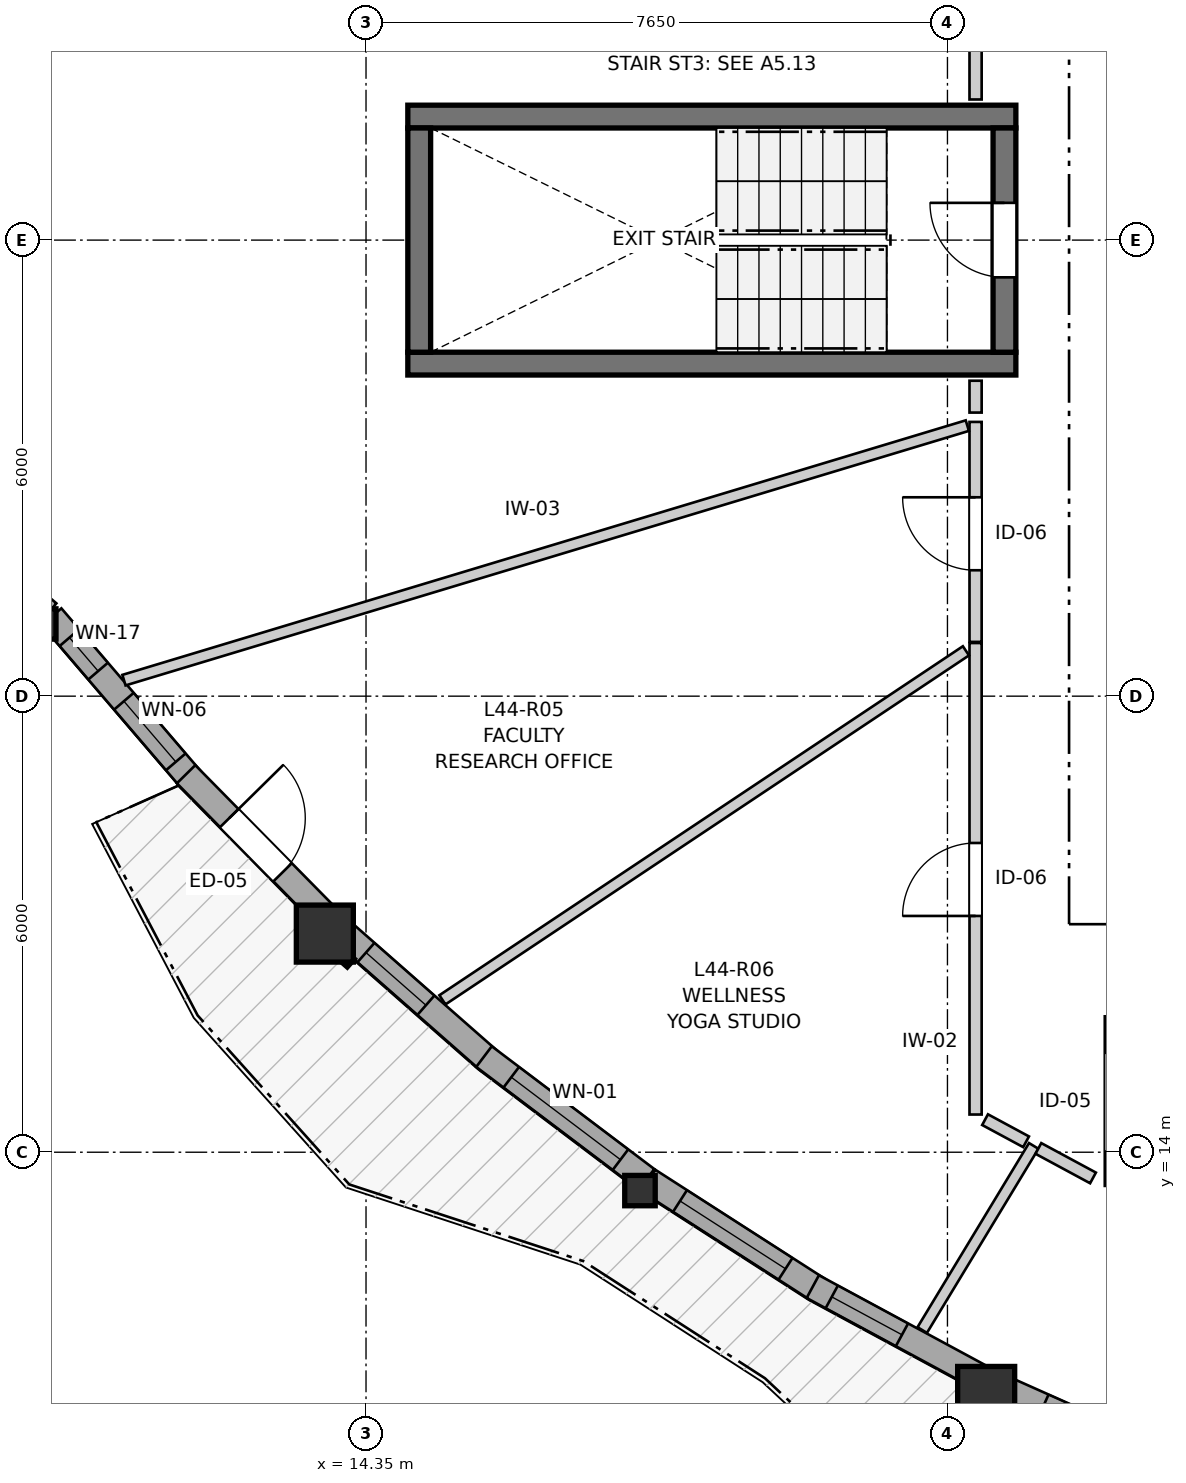
"""IFC4 building model, lengths in metres.
Left out: names, types, materials, properties, quantities, classifications, styles, units other than length and angle.
Written with IfcOpenShell. Run it as: python <this file> out.ifc"""

import sys

from ifc_helpers import new_model, si_unit, direction, frame, frame_2d, origin, origin_2d, place, context, subcontext, project, spatial, rectangle, i_section, extrude, source, transform, mapped, element, fill, save


model = new_model("IFC4")
c1 = context("Model", 3, precision=1e-05, world=origin(), true_north=direction((0.0, 1.0)))
c2 = subcontext(c1, "Body", "Model", "MODEL_VIEW")
j1 = project(units=[si_unit("LENGTHUNIT", "METRE"), si_unit("PLANEANGLEUNIT", "RADIAN")], contexts=[c1])
p1 = place(None, origin())
s1 = spatial("IfcSite", under=j1, at=p1, CompositionType="ELEMENT")
p2 = place(p1, origin())
s2 = spatial("IfcBuilding", under=s1, at=p2, CompositionType="ELEMENT")
p3 = place(p2, frame((0.0, 0.0, 149.0)))
s3 = spatial("IfcBuildingStorey", under=s2, at=p3, CompositionType="ELEMENT", Elevation=149.0)
for number, where, z_axis, x_axis in (
    (1, (14.9, 24.375, 0.0), (0.0, 0.0, 1.0), (1.0, 0.0, 0.0)),
    (2, (22.9, 27.625, 0.0), (0.0, 0.0, 1.0), (-1.0, 0.0, 0.0)),
):
    element("IfcWall", number, at=place(p3, frame(where, z_axis=z_axis, x_axis=x_axis)), inside=s3, PredefinedType="SHEAR", context=c2, shape_type="SweptSolid", body=[
        extrude(rectangle(XDim=8.0, YDim=0.3, at=frame_2d((4.0, 0.0))), origin(), (0.0, 0.0, 1.0), 2.935),
    ])
p4 = place(p3, frame((15.05, 27.475, 0.0), z_axis=(0.0, 0.0, 1.0), x_axis=(0.0, -1.0, 0.0)))
e3 = element("IfcWall", 3, at=p4, inside=s3, PredefinedType="SHEAR", context=c2, shape_type="SweptSolid", body=[
    extrude(rectangle(XDim=2.95, YDim=0.3, at=frame_2d((1.475, 0.0))), origin(), (0.0, 0.0, 1.0), 2.935),
])
p5 = place(p3, frame((22.75, 24.525, 0.0), z_axis=(0.0, 0.0, 1.0), x_axis=(0.0, 1.0, 0.0)))
e4 = element("IfcWall", 4, at=p5, inside=s3, PredefinedType="SHEAR", context=c2, shape_type="SweptSolid", body=[
    extrude(rectangle(XDim=2.95, YDim=0.3, at=frame_2d((1.475, 0.0))), origin(), (0.0, 0.0, 1.0), 2.935),
])
p6 = place(p5, frame((0.985, 0.0, 0.0)))
e5 = element("IfcOpeningElement", 5, at=p6, cuts=e4, PredefinedType="OPENING", context=c2, shape_type="SweptSolid", body=[
    extrude(rectangle(XDim=0.98, YDim=2.15, at=frame_2d((0.49, 1.075))), frame((0.0, 0.16, 0.0), z_axis=(0.0, -1.0, 0.0), x_axis=(1.0, 0.0, 0.0)), (0.0, 0.0, 1.0), 0.32),
])
m1 = source(origin(), c2, "Body", "SweptSolid", [
    extrude(i_section(OverallWidth=0.401, OverallDepth=0.399, WebThickness=0.023, FlangeThickness=0.036, FilletRadius=0.015, at=origin_2d()), origin(), (0.0, 0.0, 1.0), 2.935),
])
p7 = place(p3, frame((10.071, 20.95, 0.0), z_axis=(0.0, 0.0, 1.0), x_axis=(1.0, 0.0, 0.0)))
e6 = element("IfcColumn", 6, at=p7, inside=s3, PredefinedType="PILASTER", context=c2, shape_type="MappedRepresentation", body=[
    mapped(m1, transform((0.0, 0.0, 0.0), x_axis=(1.0, 0.0, 0.0), y_axis=(0.0, 1.0, 0.0), z_axis=(0.0, 0.0, 1.0), scale=1.0)),
])
m2 = source(origin(), c2, "Body", "SweptSolid", [
    extrude(rectangle(XDim=0.75, YDim=0.75, at=origin_2d()), origin(), (0.0, 0.0, 1.0), 2.935),
])
p8 = place(p3, frame((13.808, 16.876, 0.0), z_axis=(0.0, 0.0, 1.0), x_axis=(1.0, 0.0, 0.0)))
e7 = element("IfcColumn", 7, at=p8, inside=s3, PredefinedType="COLUMN", context=c2, shape_type="MappedRepresentation", body=[
    mapped(m2, transform((0.0, 0.0, 0.0), x_axis=(1.0, 0.0, 0.0), y_axis=(0.0, 1.0, 0.0), z_axis=(0.0, 0.0, 1.0), scale=1.0)),
])
p9 = place(p3, frame((17.954, 13.495, 0.0), z_axis=(0.0, 0.0, 1.0), x_axis=(1.0, 0.0, 0.0)))
e8 = element("IfcColumn", 8, at=p9, inside=s3, PredefinedType="PILASTER", context=c2, shape_type="MappedRepresentation", body=[
    mapped(m1, transform((0.0, 0.0, 0.0), x_axis=(1.0, 0.0, 0.0), y_axis=(0.0, 1.0, 0.0), z_axis=(0.0, 0.0, 1.0), scale=1.0)),
])
p10 = place(p3, frame((22.51, 10.807, 0.0), z_axis=(0.0, 0.0, 1.0), x_axis=(1.0, 0.0, 0.0)))
e9 = element("IfcColumn", 9, at=p10, inside=s3, PredefinedType="COLUMN", context=c2, shape_type="MappedRepresentation", body=[
    mapped(m2, transform((0.0, 0.0, 0.0), x_axis=(1.0, 0.0, 0.0), y_axis=(0.0, 1.0, 0.0), z_axis=(0.0, 0.0, 1.0), scale=1.0)),
])
p11 = place(p3, frame((8.627, 22.406, 0.0), z_axis=(0.0, 0.0, 1.0), x_axis=(0.760379886087, -0.649478582276, 0.0)))
e10 = element("IfcWall", 10, at=p11, inside=s3, PredefinedType="SOLIDWALL", context=c2, shape_type="SweptSolid", body=[
    extrude(rectangle(XDim=2.023, YDim=0.34, at=frame_2d((1.012, 0.0))), origin(), (0.0, 0.0, 1.0), 2.515),
])
p12 = place(p11, frame((0.257, 0.0, 0.82)))
e11 = element("IfcOpeningElement", 11, at=p12, cuts=e10, PredefinedType="OPENING", context=c2, shape_type="SweptSolid", body=[
    extrude(rectangle(XDim=1.45, YDim=1.25, at=frame_2d((0.725, 0.625))), frame((0.0, 0.18, 0.0), z_axis=(0.0, -1.0, 0.0), x_axis=(1.0, 0.0, 0.0)), (0.0, 0.0, 1.0), 0.36),
])
p13 = place(p3, frame((10.213, 21.045, 0.0), z_axis=(0.0, 0.0, 1.0), x_axis=(0.65036245252, -0.759624038819, 0.0)))
e12 = element("IfcWall", 12, at=p13, inside=s3, PredefinedType="SOLIDWALL", context=c2, shape_type="SweptSolid", body=[
    extrude(rectangle(XDim=2.813, YDim=0.34, at=frame_2d((1.407, 0.0))), origin(), (0.0, 0.0, 1.0), 2.515),
])
p14 = place(p13, frame((0.362, 0.0, 0.82)))
e13 = element("IfcOpeningElement", 13, at=p14, cuts=e12, PredefinedType="OPENING", context=c2, shape_type="SweptSolid", body=[
    extrude(rectangle(XDim=0.58, YDim=1.35, at=frame_2d((0.29, 0.675))), frame((0.0, 0.18, 0.0), z_axis=(0.0, -1.0, 0.0), x_axis=(1.0, 0.0, 0.0)), (0.0, 0.0, 1.0), 0.36),
])
p15 = place(p13, frame((1.463, 0.0, 0.82)))
e14 = element("IfcOpeningElement", 14, at=p15, cuts=e12, PredefinedType="OPENING", context=c2, shape_type="SweptSolid", body=[
    extrude(rectangle(XDim=1.05, YDim=1.45, at=frame_2d((0.525, 0.725))), frame((0.0, 0.18, 0.0), z_axis=(0.0, -1.0, 0.0), x_axis=(1.0, 0.0, 0.0)), (0.0, 0.0, 1.0), 0.36),
])
p16 = place(p3, frame((11.983, 18.973, 0.0), z_axis=(0.0, 0.0, 1.0), x_axis=(0.701539452628, -0.712630617084, 0.0)))
e15 = element("IfcWall", 15, at=p16, inside=s3, PredefinedType="SOLIDWALL", context=c2, shape_type="SweptSolid", body=[
    extrude(rectangle(XDim=2.619, YDim=0.34, at=frame_2d((1.31, 0.0))), origin(), (0.0, 0.0, 1.0), 2.515),
])
p17 = place(p16, frame((0.81, 0.0, 0.0)))
e16 = element("IfcOpeningElement", 16, at=p17, cuts=e15, PredefinedType="OPENING", context=c2, shape_type="SweptSolid", body=[
    extrude(rectangle(XDim=1.0, YDim=2.1, at=frame_2d((0.5, 1.05))), frame((0.0, 0.18, 0.0), z_axis=(0.0, -1.0, 0.0), x_axis=(1.0, 0.0, 0.0)), (0.0, 0.0, 1.0), 0.36),
])
p18 = place(p3, frame((14.037, 16.902, 0.0), z_axis=(0.0, 0.0, 1.0), x_axis=(0.751106484969, -0.66018107231, 0.0)))
e17 = element("IfcWall", 17, at=p18, inside=s3, PredefinedType="SOLIDWALL", context=c2, shape_type="SweptSolid", body=[
    extrude(rectangle(XDim=2.575, YDim=0.34, at=frame_2d((1.288, 0.0))), origin(), (0.0, 0.0, 1.0), 2.515),
])
p19 = place(p18, frame((0.416, 0.0, 0.82)))
e18 = element("IfcOpeningElement", 18, at=p19, cuts=e17, PredefinedType="OPENING", context=c2, shape_type="SweptSolid", body=[
    extrude(rectangle(XDim=1.05, YDim=1.45, at=frame_2d((0.525, 0.725))), frame((0.0, 0.18, 0.0), z_axis=(0.0, -1.0, 0.0), x_axis=(1.0, 0.0, 0.0)), (0.0, 0.0, 1.0), 0.36),
])
p20 = place(p3, frame((15.902, 15.258, 0.0), z_axis=(0.0, 0.0, 1.0), x_axis=(0.798071768164, -0.60256240578, 0.0)))
e19 = element("IfcWall", 19, at=p20, inside=s3, PredefinedType="SOLIDWALL", context=c2, shape_type="SweptSolid", body=[
    extrude(rectangle(XDim=2.68, YDim=0.34, at=frame_2d((1.34, 0.0))), origin(), (0.0, 0.0, 1.0), 2.515),
])
p21 = place(p20, frame((0.45, 0.0, 0.82)))
e20 = element("IfcOpeningElement", 20, at=p21, cuts=e19, PredefinedType="OPENING", context=c2, shape_type="SweptSolid", body=[
    extrude(rectangle(XDim=1.8, YDim=1.45, at=frame_2d((0.9, 0.725))), frame((0.0, 0.18, 0.0), z_axis=(0.0, -1.0, 0.0), x_axis=(1.0, 0.0, 0.0)), (0.0, 0.0, 1.0), 0.36),
])
p22 = place(p3, frame((18.063, 13.627, 0.0), z_axis=(0.0, 0.0, 1.0), x_axis=(0.841291581189, -0.540581608475, 0.0)))
e21 = element("IfcWall", 21, at=p22, inside=s3, PredefinedType="SOLIDWALL", context=c2, shape_type="SweptSolid", body=[
    extrude(rectangle(XDim=2.665, YDim=0.34, at=frame_2d((1.332, 0.0))), origin(), (0.0, 0.0, 1.0), 2.515),
])
p23 = place(p22, frame((0.497, 0.0, 0.82)))
e22 = element("IfcOpeningElement", 22, at=p23, cuts=e21, PredefinedType="OPENING", context=c2, shape_type="SweptSolid", body=[
    extrude(rectangle(XDim=1.65, YDim=1.45, at=frame_2d((0.825, 0.725))), frame((0.0, 0.18, 0.0), z_axis=(0.0, -1.0, 0.0), x_axis=(1.0, 0.0, 0.0)), (0.0, 0.0, 1.0), 0.36),
])
p24 = place(p3, frame((20.228, 12.232, 0.0), z_axis=(0.0, 0.0, 1.0), x_axis=(0.879850512407, -0.47525054005, 0.0)))
e23 = element("IfcWall", 23, at=p24, inside=s3, PredefinedType="SOLIDWALL", context=c2, shape_type="SweptSolid", body=[
    extrude(rectangle(XDim=2.53, YDim=0.34, at=frame_2d((1.265, 0.0))), origin(), (0.0, 0.0, 1.0), 2.515),
])
p25 = place(p24, frame((0.284, 0.0, 0.82)))
e24 = element("IfcOpeningElement", 24, at=p25, cuts=e23, PredefinedType="OPENING", context=c2, shape_type="SweptSolid", body=[
    extrude(rectangle(XDim=1.05, YDim=1.45, at=frame_2d((0.525, 0.725))), frame((0.0, 0.18, 0.0), z_axis=(0.0, -1.0, 0.0), x_axis=(1.0, 0.0, 0.0)), (0.0, 0.0, 1.0), 0.36),
])
p26 = place(p3, frame((22.72, 10.899, 0.0), z_axis=(0.0, 0.0, 1.0), x_axis=(0.913229052506, -0.407446558041, 0.0)))
e25 = element("IfcWall", 25, at=p26, inside=s3, PredefinedType="SOLIDWALL", context=c2, shape_type="SweptSolid", body=[
    extrude(rectangle(XDim=2.545, YDim=0.34, at=frame_2d((1.272, 0.0))), origin(), (0.0, 0.0, 1.0), 2.515),
])
p27 = place(p26, frame((0.592, 0.0, 0.82)))
e26 = element("IfcOpeningElement", 26, at=p27, cuts=e25, PredefinedType="OPENING", context=c2, shape_type="SweptSolid", body=[
    extrude(rectangle(XDim=1.35, YDim=1.45, at=frame_2d((0.675, 0.725))), frame((0.0, 0.18, 0.0), z_axis=(0.0, -1.0, 0.0), x_axis=(1.0, 0.0, 0.0)), (0.0, 0.0, 1.0), 0.36),
])
p28 = place(p3, frame((22.37, 14.496, 0.0), z_axis=(0.0, 0.0, 1.0), x_axis=(0.0, 1.0, 0.0)))
e27 = element("IfcWall", 27, at=p28, inside=s3, PredefinedType="PARTITIONING", context=c2, shape_type="SweptSolid", body=[
    extrude(rectangle(XDim=6.203, YDim=0.16, at=frame_2d((3.102, 0.0))), origin(), (0.0, 0.0, 1.0), 2.935),
])
p29 = place(p28, frame((2.613, 0.0, 0.0)))
e28 = element("IfcOpeningElement", 28, at=p29, cuts=e27, PredefinedType="OPENING", context=c2, shape_type="SweptSolid", body=[
    extrude(rectangle(XDim=0.96, YDim=2.1, at=frame_2d((0.48, 1.05))), frame((0.0, 0.09, 0.0), z_axis=(0.0, -1.0, 0.0), x_axis=(1.0, 0.0, 0.0)), (0.0, 0.0, 1.0), 0.18),
])
p30 = place(p3, frame((22.37, 27.85, 0.0), z_axis=(0.0, 0.0, 1.0), x_axis=(0.0, 1.0, 0.0)))
e29 = element("IfcWall", 29, at=p30, inside=s3, PredefinedType="PARTITIONING", context=c2, shape_type="SweptSolid", body=[
    extrude(rectangle(XDim=3.646, YDim=0.16, at=frame_2d((1.823, 0.0))), origin(), (0.0, 0.0, 1.0), 2.935),
])
p31 = place(p30, frame((1.194, 0.0, 0.0)))
e30 = element("IfcOpeningElement", 30, at=p31, cuts=e29, PredefinedType="OPENING", context=c2, shape_type="SweptSolid", body=[
    extrude(rectangle(XDim=1.3, YDim=2.1, at=frame_2d((0.65, 1.05))), frame((0.0, 0.09, 0.0), z_axis=(0.0, -1.0, 0.0), x_axis=(1.0, 0.0, 0.0)), (0.0, 0.0, 1.0), 0.18),
])
p32 = place(p3, frame((22.37, 20.714, 0.0), z_axis=(0.0, 0.0, 1.0), x_axis=(0.0, 1.0, 0.0)))
e31 = element("IfcWall", 31, at=p32, inside=s3, PredefinedType="PARTITIONING", context=c2, shape_type="SweptSolid", body=[
    extrude(rectangle(XDim=2.894, YDim=0.16, at=frame_2d((1.447, 0.0))), origin(), (0.0, 0.0, 1.0), 2.935),
])
p33 = place(p32, frame((0.942, 0.0, 0.0)))
e32 = element("IfcOpeningElement", 32, at=p33, cuts=e31, PredefinedType="OPENING", context=c2, shape_type="SweptSolid", body=[
    extrude(rectangle(XDim=0.96, YDim=2.1, at=frame_2d((0.48, 1.05))), frame((0.0, 0.09, 0.0), z_axis=(0.0, -1.0, 0.0), x_axis=(1.0, 0.0, 0.0)), (0.0, 0.0, 1.0), 0.18),
])
p34 = place(p3, frame((24.15, 15.788, 0.0), z_axis=(0.0, 0.0, 1.0), x_axis=(0.0, -1.0, 0.0)))
e33 = element("IfcWall", 33, at=p34, inside=s3, PredefinedType="PARTITIONING", context=c2, shape_type="SweptSolid", body=[
    extrude(rectangle(XDim=2.231, YDim=0.16, at=frame_2d((1.116, 0.0))), origin(), (0.0, 0.0, 1.0), 2.935),
])
p35 = place(p34, frame((0.48, 0.0, 0.0)))
e34 = element("IfcOpeningElement", 34, at=p35, cuts=e33, PredefinedType="OPENING", context=c2, shape_type="SweptSolid", body=[
    extrude(rectangle(XDim=1.3, YDim=2.1, at=frame_2d((0.65, 1.05))), frame((0.0, 0.09, 0.0), z_axis=(0.0, -1.0, 0.0), x_axis=(1.0, 0.0, 0.0)), (0.0, 0.0, 1.0), 0.18),
])
p36 = place(p3, frame((11.165, 20.211, 0.0), z_axis=(0.0, 0.0, 1.0), x_axis=(0.957361241888, 0.288893496865, 0.0)))
e35 = element("IfcWall", 35, at=p36, inside=s3, PredefinedType="PARTITIONING", context=c2, shape_type="SweptSolid", body=[
    extrude(rectangle(XDim=11.59, YDim=0.145, at=frame_2d((5.795, 0.0))), origin(), (0.0, 0.0, 1.0), 2.935),
])
p37 = place(p3, frame((15.355, 16.005, 0.0), z_axis=(0.0, 0.0, 1.0), x_axis=(0.83207298021, 0.55466616591, 0.0)))
e36 = element("IfcWall", 36, at=p37, inside=s3, PredefinedType="PARTITIONING", context=c2, shape_type="SweptSolid", body=[
    extrude(rectangle(XDim=8.278, YDim=0.145, at=frame_2d((4.139, 0.0))), origin(), (0.0, 0.0, 1.0), 2.935),
])
p38 = place(p3, frame((21.668, 11.66, 0.0), z_axis=(0.0, 0.0, 1.0), x_axis=(0.517927198926, 0.855424699557, 0.0)))
e37 = element("IfcWall", 37, at=p38, inside=s3, PredefinedType="PARTITIONING", context=c2, shape_type="SweptSolid", body=[
    extrude(rectangle(XDim=2.832, YDim=0.145, at=frame_2d((1.416, 0.0))), origin(), (0.0, 0.0, 1.0), 2.935),
])
p39 = place(p3, frame((23.196, 14.05, 0.0), z_axis=(0.0, 0.0, 1.0), x_axis=(0.880125284311, -0.474741491673, 0.0)))
e38 = element("IfcWall", 38, at=p39, inside=s3, PredefinedType="PARTITIONING", context=c2, shape_type="SweptSolid", body=[
    extrude(rectangle(XDim=0.817, YDim=0.16, at=frame_2d((0.408, 0.0))), origin(), (0.0, 0.0, 1.0), 2.935),
])
p40 = place(p3, frame((22.495, 14.428, 0.0), z_axis=(0.0, 0.0, 1.0), x_axis=(0.880048601236, -0.474883627285, 0.0)))
e39 = element("IfcWall", 39, at=p40, inside=s3, PredefinedType="PARTITIONING", context=c2, shape_type="SweptSolid", body=[
    extrude(rectangle(XDim=0.613, YDim=0.16, at=frame_2d((0.306, 0.0))), origin(), (0.0, 0.0, 1.0), 2.935),
])
p41 = place(p3, frame((22.37, 23.731, 0.0), z_axis=(0.0, 0.0, 1.0), x_axis=(0.0, 1.0, 0.0)))
e40 = element("IfcWall", 40, at=p41, inside=s3, PredefinedType="PARTITIONING", context=c2, shape_type="SweptSolid", body=[
    extrude(rectangle(XDim=0.419, YDim=0.16, at=frame_2d((0.209, 0.0))), origin(), (0.0, 0.0, 1.0), 2.935),
])
m3 = source(origin(), c2, "Body", "SweptSolid", [
    extrude(rectangle(XDim=0.58, YDim=1.35, at=frame_2d((0.29, 0.675))), frame((0.0, 0.03, 0.0), z_axis=(0.0, -1.0, 0.0), x_axis=(1.0, 0.0, 0.0)), (0.0, 0.0, 1.0), 0.06),
])
p42 = place(p14, origin())
e41 = element("IfcWindow", 41, at=p42, inside=s3, PartitioningType="SINGLE_PANEL", PredefinedType="WINDOW", context=c2, shape_type="MappedRepresentation", body=[
    mapped(m3, transform((0.0, 0.0, 0.0), x_axis=(1.0, 0.0, 0.0), y_axis=(0.0, 1.0, 0.0), z_axis=(0.0, 0.0, 1.0), scale=1.0)),
])
fill(e13, e41)
m4 = source(origin(), c2, "Body", "SweptSolid", [
    extrude(rectangle(XDim=1.05, YDim=1.45, at=frame_2d((0.525, 0.725))), frame((0.0, 0.03, 0.0), z_axis=(0.0, -1.0, 0.0), x_axis=(1.0, 0.0, 0.0)), (0.0, 0.0, 1.0), 0.06),
])
p43 = place(p15, origin())
e42 = element("IfcWindow", 42, at=p43, inside=s3, PartitioningType="SINGLE_PANEL", PredefinedType="WINDOW", context=c2, shape_type="MappedRepresentation", body=[
    mapped(m4, transform((0.0, 0.0, 0.0), x_axis=(1.0, 0.0, 0.0), y_axis=(0.0, 1.0, 0.0), z_axis=(0.0, 0.0, 1.0), scale=1.0)),
])
fill(e14, e42)
p44 = place(p19, origin())
e43 = element("IfcWindow", 43, at=p44, inside=s3, PartitioningType="SINGLE_PANEL", PredefinedType="WINDOW", context=c2, shape_type="MappedRepresentation", body=[
    mapped(m4, transform((0.0, 0.0, 0.0), x_axis=(1.0, 0.0, 0.0), y_axis=(0.0, 1.0, 0.0), z_axis=(0.0, 0.0, 1.0), scale=1.0)),
])
fill(e18, e43)
m5 = source(origin(), c2, "Body", "SweptSolid", [
    extrude(rectangle(XDim=1.8, YDim=1.45, at=frame_2d((0.9, 0.725))), frame((0.0, 0.03, 0.0), z_axis=(0.0, -1.0, 0.0), x_axis=(1.0, 0.0, 0.0)), (0.0, 0.0, 1.0), 0.06),
])
p45 = place(p21, origin())
e44 = element("IfcWindow", 44, at=p45, inside=s3, PartitioningType="SINGLE_PANEL", PredefinedType="WINDOW", context=c2, shape_type="MappedRepresentation", body=[
    mapped(m5, transform((0.0, 0.0, 0.0), x_axis=(1.0, 0.0, 0.0), y_axis=(0.0, 1.0, 0.0), z_axis=(0.0, 0.0, 1.0), scale=1.0)),
])
fill(e20, e44)
m6 = source(origin(), c2, "Body", "SweptSolid", [
    extrude(rectangle(XDim=1.65, YDim=1.45, at=frame_2d((0.825, 0.725))), frame((0.0, 0.03, 0.0), z_axis=(0.0, -1.0, 0.0), x_axis=(1.0, 0.0, 0.0)), (0.0, 0.0, 1.0), 0.06),
])
p46 = place(p23, origin())
e45 = element("IfcWindow", 45, at=p46, inside=s3, PartitioningType="SINGLE_PANEL", PredefinedType="WINDOW", context=c2, shape_type="MappedRepresentation", body=[
    mapped(m6, transform((0.0, 0.0, 0.0), x_axis=(1.0, 0.0, 0.0), y_axis=(0.0, 1.0, 0.0), z_axis=(0.0, 0.0, 1.0), scale=1.0)),
])
fill(e22, e45)
p47 = place(p25, origin())
e46 = element("IfcWindow", 46, at=p47, inside=s3, PartitioningType="SINGLE_PANEL", PredefinedType="WINDOW", context=c2, shape_type="MappedRepresentation", body=[
    mapped(m4, transform((0.0, 0.0, 0.0), x_axis=(1.0, 0.0, 0.0), y_axis=(0.0, 1.0, 0.0), z_axis=(0.0, 0.0, 1.0), scale=1.0)),
])
fill(e24, e46)
m7 = source(origin(), c2, "Body", "SweptSolid", [
    extrude(rectangle(XDim=1.0, YDim=2.1, at=frame_2d((0.5, 1.05))), frame((0.0, 0.025, 0.0), z_axis=(0.0, -1.0, 0.0), x_axis=(1.0, 0.0, 0.0)), (0.0, 0.0, 1.0), 0.05),
])
p48 = place(p17, origin())
e47 = element("IfcDoor", 47, at=p48, inside=s3, OperationType="SINGLE_SWING_LEFT", PredefinedType="DOOR", context=c2, shape_type="MappedRepresentation", body=[
    mapped(m7, transform((0.0, 0.0, 0.0), x_axis=(1.0, 0.0, 0.0), y_axis=(0.0, 1.0, 0.0), z_axis=(0.0, 0.0, 1.0), scale=1.0)),
])
fill(e16, e47)
m8 = source(origin(), c2, "Body", "SweptSolid", [
    extrude(rectangle(XDim=0.98, YDim=2.15, at=frame_2d((0.49, 1.075))), frame((0.0, 0.025, 0.0), z_axis=(0.0, -1.0, 0.0), x_axis=(1.0, 0.0, 0.0)), (0.0, 0.0, 1.0), 0.05),
])
p49 = place(p6, origin())
e48 = element("IfcDoor", 48, at=p49, inside=s3, OperationType="SINGLE_SWING_RIGHT", PredefinedType="DOOR", context=c2, shape_type="MappedRepresentation", body=[
    mapped(m8, transform((0.0, 0.0, 0.0), x_axis=(1.0, 0.0, 0.0), y_axis=(0.0, 1.0, 0.0), z_axis=(0.0, 0.0, 1.0), scale=1.0)),
])
fill(e5, e48)
m9 = source(origin(), c2, "Body", "SweptSolid", [
    extrude(rectangle(XDim=0.96, YDim=2.1, at=frame_2d((0.48, 1.05))), frame((0.0, 0.025, 0.0), z_axis=(0.0, -1.0, 0.0), x_axis=(1.0, 0.0, 0.0)), (0.0, 0.0, 1.0), 0.05),
])
p50 = place(p29, origin())
e49 = element("IfcDoor", 49, at=p50, inside=s3, OperationType="SINGLE_SWING_LEFT", PredefinedType="DOOR", context=c2, shape_type="MappedRepresentation", body=[
    mapped(m9, transform((0.0, 0.0, 0.0), x_axis=(1.0, 0.0, 0.0), y_axis=(0.0, 1.0, 0.0), z_axis=(0.0, 0.0, 1.0), scale=1.0)),
])
fill(e28, e49)
p51 = place(p33, origin())
e50 = element("IfcDoor", 50, at=p51, inside=s3, OperationType="SINGLE_SWING_RIGHT", PredefinedType="DOOR", context=c2, shape_type="MappedRepresentation", body=[
    mapped(m9, transform((0.0, 0.0, 0.0), x_axis=(1.0, 0.0, 0.0), y_axis=(0.0, 1.0, 0.0), z_axis=(0.0, 0.0, 1.0), scale=1.0)),
])
fill(e32, e50)
save(model, sys.argv[1])
